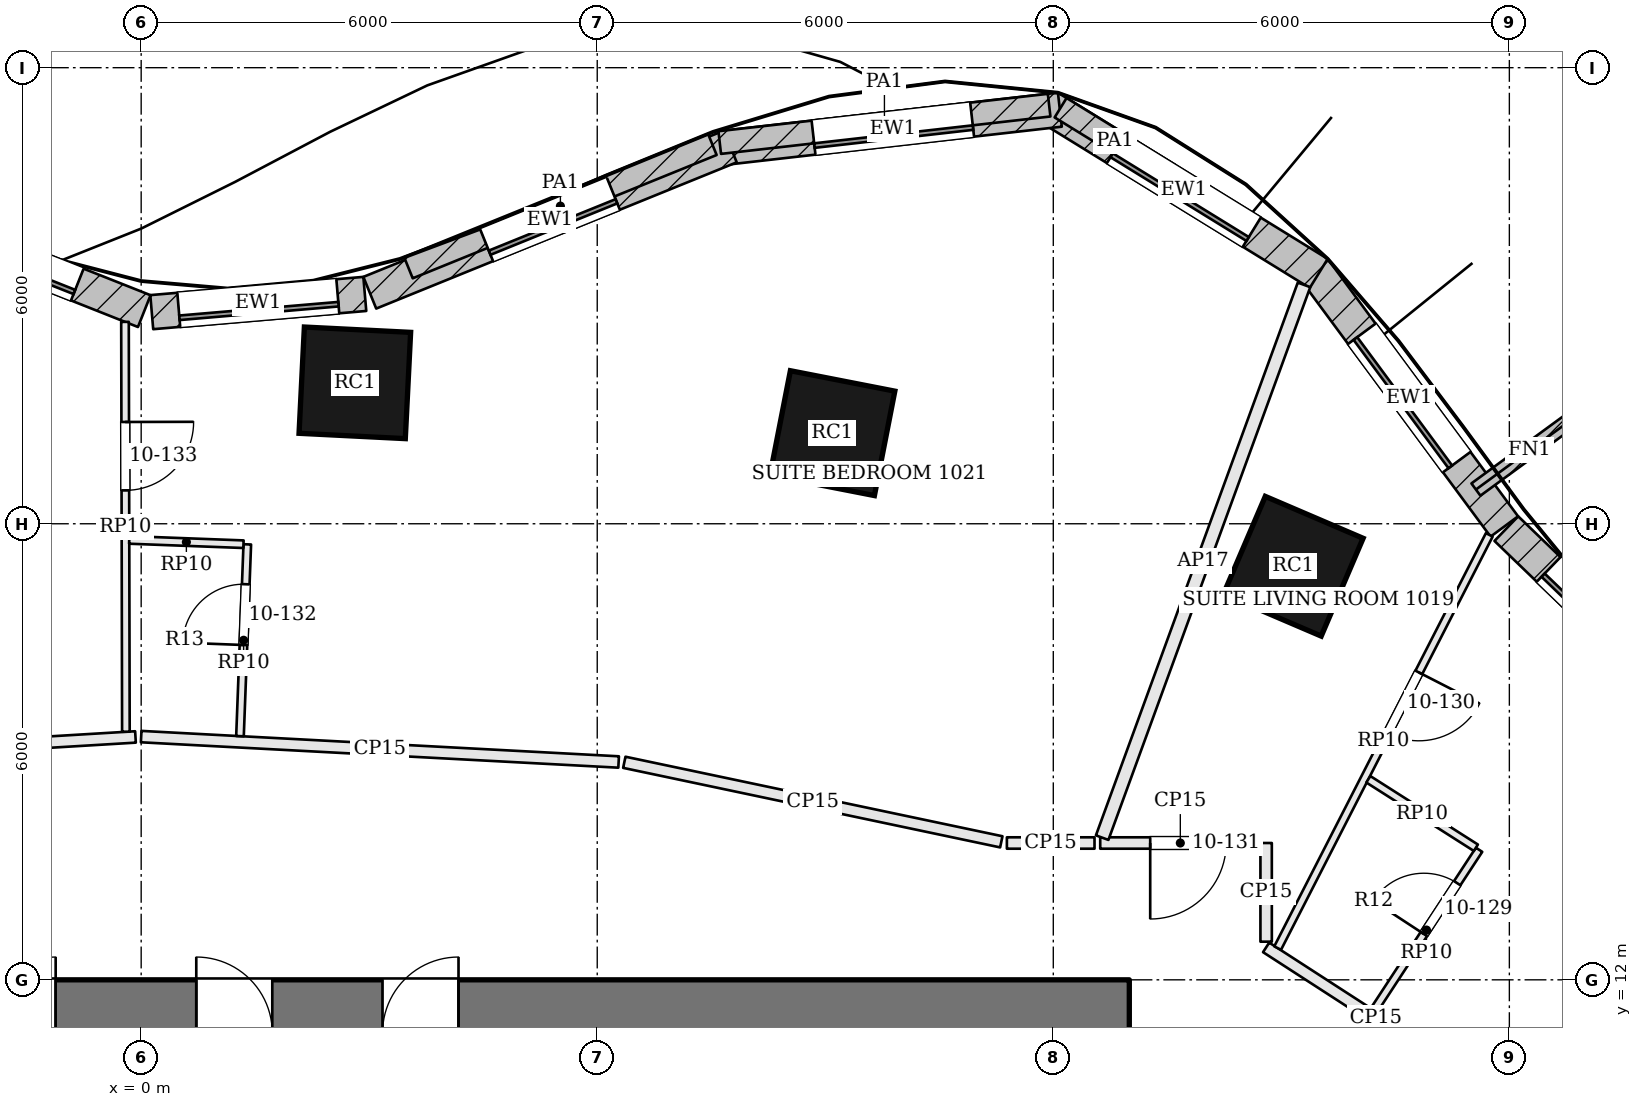
"""IFC4 building model, lengths in metres.
Left out: names, types, materials, properties, quantities, classifications, styles, units other than length and angle.
Written with IfcOpenShell. Run it as: python <this file> out.ifc"""

import sys

from ifc_helpers import new_model, si_unit, direction, frame, frame_2d, origin, origin_2d, place, context, subcontext, project, spatial, rectangle, extrude, element, fill, save


model = new_model("IFC4")
c1 = context("Model", 3, precision=1e-05, world=origin(), true_north=direction((0.0, 1.0)))
c2 = subcontext(c1, "Body", "Model", "MODEL_VIEW")
j1 = project(units=[si_unit("LENGTHUNIT", "METRE"), si_unit("PLANEANGLEUNIT", "RADIAN")], contexts=[c1])
p1 = place(None, origin())
s1 = spatial("IfcSite", under=j1, at=p1, CompositionType="ELEMENT")
p2 = place(p1, origin())
s2 = spatial("IfcBuilding", under=s1, at=p2, CompositionType="ELEMENT")
p3 = place(p2, frame((0.0, 0.0, 51.9)))
s3 = spatial("IfcBuildingStorey", under=s2, at=p3, CompositionType="ELEMENT", Elevation=51.9)
p4 = place(p3, frame((-13.0, 11.3, 0.0), z_axis=(0.0, 0.0, 1.0), x_axis=(1.0, 0.0, 0.0)))
e1 = element("IfcWall", 1, at=p4, inside=s3, PredefinedType="SHEAR", context=c2, shape_type="SweptSolid", body=[
    extrude(rectangle(XDim=26.0, YDim=1.4, at=frame_2d((13.0, 0.0))), origin(), (0.0, 0.0, 1.0), 3.6),
])
p5 = place(p4, frame((8.575, 0.0, 0.0)))
e2 = element("IfcOpeningElement", 2, at=p5, cuts=e1, PredefinedType="OPENING", context=c2, shape_type="SweptSolid", body=[
    extrude(rectangle(XDim=0.7, YDim=2.1, at=frame_2d((0.35, 1.05))), frame((0.0, 0.71, 0.0), z_axis=(0.0, -1.0, 0.0), x_axis=(1.0, 0.0, 0.0)), (0.0, 0.0, 1.0), 1.42),
])
p6 = place(p4, frame((10.875, 0.0, 0.0)))
e3 = element("IfcOpeningElement", 3, at=p6, cuts=e1, PredefinedType="OPENING", context=c2, shape_type="SweptSolid", body=[
    extrude(rectangle(XDim=1.0, YDim=2.1, at=frame_2d((0.5, 1.05))), frame((0.0, 0.71, 0.0), z_axis=(0.0, -1.0, 0.0), x_axis=(1.0, 0.0, 0.0)), (0.0, 0.0, 1.0), 1.42),
])
p7 = place(p4, frame((13.725, 0.0, 0.0)))
e4 = element("IfcOpeningElement", 4, at=p7, cuts=e1, PredefinedType="OPENING", context=c2, shape_type="SweptSolid", body=[
    extrude(rectangle(XDim=1.0, YDim=2.1, at=frame_2d((0.5, 1.05))), frame((0.0, 0.71, 0.0), z_axis=(0.0, -1.0, 0.0), x_axis=(1.0, 0.0, 0.0)), (0.0, 0.0, 1.0), 1.42),
])
p8 = place(p4, frame((16.175, 0.0, 0.0)))
e5 = element("IfcOpeningElement", 5, at=p8, cuts=e1, PredefinedType="OPENING", context=c2, shape_type="SweptSolid", body=[
    extrude(rectangle(XDim=1.0, YDim=2.1, at=frame_2d((0.5, 1.05))), frame((0.0, 0.71, 0.0), z_axis=(0.0, -1.0, 0.0), x_axis=(1.0, 0.0, 0.0)), (0.0, 0.0, 1.0), 1.42),
])
for number, where, z_axis, x_axis in (
    (6, (15.157, 17.441, 0.0), (0.0, 0.0, 1.0), (-0.919, 0.394, 0.0)),
    (7, (9.094, 19.192, 0.0), (0.0, 0.0, 1.0), (-0.981, 0.192, 0.0)),
    (8, (2.811, 19.854, 0.0), (0.0, 0.0, 1.0), (-0.999, 0.05, 0.0)),
):
    element("IfcColumn", number, at=place(p3, frame(where, z_axis=z_axis, x_axis=x_axis)), inside=s3, PredefinedType="COLUMN", context=c2, shape_type="SweptSolid", body=[
        extrude(rectangle(XDim=1.4, YDim=1.4, at=origin_2d()), origin(), (0.0, 0.0, 1.0), 3.6),
    ])
p9 = place(p3, frame((20.585, 15.406, 0.0), z_axis=(0.0, 0.0, 1.0), x_axis=(-0.719978118026, 0.693996764808, 0.0)))
e9 = element("IfcWall", 9, at=p9, inside=s3, PredefinedType="SOLIDWALL", context=c2, shape_type="SweptSolid", body=[
    extrude(rectangle(XDim=3.646, YDim=0.45, at=frame_2d((1.823, 0.0))), origin(), (0.0, 0.0, 1.0), 3.4),
])
p10 = place(p9, frame((0.773, 0.0, 0.9)))
e10 = element("IfcOpeningElement", 10, at=p10, cuts=e9, PredefinedType="OPENING", context=c2, shape_type="SweptSolid", body=[
    extrude(rectangle(XDim=2.1, YDim=2.0, at=frame_2d((1.05, 1.0))), frame((0.0, 0.235, 0.0), z_axis=(0.0, -1.0, 0.0), x_axis=(1.0, 0.0, 0.0)), (0.0, 0.0, 1.0), 0.47),
])
p11 = place(p3, frame((17.934, 17.964, 0.0), z_axis=(0.0, 0.0, 1.0), x_axis=(-0.594544447368, 0.804062746372, 0.0)))
e11 = element("IfcWall", 11, at=p11, inside=s3, PredefinedType="SOLIDWALL", context=c2, shape_type="SweptSolid", body=[
    extrude(rectangle(XDim=4.207, YDim=0.45, at=frame_2d((2.103, 0.0))), origin(), (0.0, 0.0, 1.0), 3.4),
])
p12 = place(p11, frame((1.053, 0.0, 0.9)))
e12 = element("IfcOpeningElement", 12, at=p12, cuts=e11, PredefinedType="OPENING", context=c2, shape_type="SweptSolid", body=[
    extrude(rectangle(XDim=2.1, YDim=2.0, at=frame_2d((1.05, 1.0))), frame((0.0, 0.235, 0.0), z_axis=(0.0, -1.0, 0.0), x_axis=(1.0, 0.0, 0.0)), (0.0, 0.0, 1.0), 0.47),
])
p13 = place(p3, frame((15.492, 21.293, 0.0), z_axis=(0.0, 0.0, 1.0), x_axis=(-0.851428967753, 0.524469935145, 0.0)))
e13 = element("IfcWall", 13, at=p13, inside=s3, PredefinedType="SOLIDWALL", context=c2, shape_type="SweptSolid", body=[
    extrude(rectangle(XDim=4.168, YDim=0.45, at=frame_2d((2.084, 0.0))), origin(), (0.0, 0.0, 1.0), 3.4),
])
p14 = place(p13, frame((1.034, 0.0, 0.9)))
e14 = element("IfcOpeningElement", 14, at=p14, cuts=e13, PredefinedType="OPENING", context=c2, shape_type="SweptSolid", body=[
    extrude(rectangle(XDim=2.1, YDim=2.0, at=frame_2d((1.05, 1.0))), frame((0.0, 0.235, 0.0), z_axis=(0.0, -1.0, 0.0), x_axis=(1.0, 0.0, 0.0)), (0.0, 0.0, 1.0), 0.47),
])
p15 = place(p3, frame((12.086, 23.448, 0.0), z_axis=(0.0, 0.0, 1.0), x_axis=(-0.993615664665, -0.112818043472, 0.0)))
e15 = element("IfcWall", 15, at=p15, inside=s3, PredefinedType="SOLIDWALL", context=c2, shape_type="SweptSolid", body=[
    extrude(rectangle(XDim=4.423, YDim=0.45, at=frame_2d((2.212, 0.0))), origin(), (0.0, 0.0, 1.0), 3.4),
])
p16 = place(p15, frame((1.162, 0.0, 0.9)))
e16 = element("IfcOpeningElement", 16, at=p16, cuts=e15, PredefinedType="OPENING", context=c2, shape_type="SweptSolid", body=[
    extrude(rectangle(XDim=2.1, YDim=2.0, at=frame_2d((1.05, 1.0))), frame((0.0, 0.235, 0.0), z_axis=(0.0, -1.0, 0.0), x_axis=(1.0, 0.0, 0.0)), (0.0, 0.0, 1.0), 0.47),
])
p17 = place(p3, frame((7.75, 22.964, 0.0), z_axis=(0.0, 0.0, 1.0), x_axis=(-0.926629703254, -0.375975255897, 0.0)))
e17 = element("IfcWall", 17, at=p17, inside=s3, PredefinedType="SOLIDWALL", context=c2, shape_type="SweptSolid", body=[
    extrude(rectangle(XDim=5.118, YDim=0.45, at=frame_2d((2.559, 0.0))), origin(), (0.0, 0.0, 1.0), 3.4),
])
p18 = place(p17, frame((1.659, 0.0, 0.9)))
e18 = element("IfcOpeningElement", 18, at=p18, cuts=e17, PredefinedType="OPENING", context=c2, shape_type="SweptSolid", body=[
    extrude(rectangle(XDim=1.8, YDim=2.0, at=frame_2d((0.9, 1.0))), frame((0.0, 0.235, 0.0), z_axis=(0.0, -1.0, 0.0), x_axis=(1.0, 0.0, 0.0)), (0.0, 0.0, 1.0), 0.47),
])
p19 = place(p3, frame((2.942, 21.024, 0.0), z_axis=(0.0, 0.0, 1.0), x_axis=(-0.996362034459, -0.085221454389, 0.0)))
e19 = element("IfcWall", 19, at=p19, inside=s3, PredefinedType="SOLIDWALL", context=c2, shape_type="SweptSolid", body=[
    extrude(rectangle(XDim=2.813, YDim=0.45, at=frame_2d((1.407, 0.0))), origin(), (0.0, 0.0, 1.0), 3.4),
])
p20 = place(p19, frame((0.357, 0.0, 0.9)))
e20 = element("IfcOpeningElement", 20, at=p20, cuts=e19, PredefinedType="OPENING", context=c2, shape_type="SweptSolid", body=[
    extrude(rectangle(XDim=2.1, YDim=2.0, at=frame_2d((1.05, 1.0))), frame((0.0, 0.235, 0.0), z_axis=(0.0, -1.0, 0.0), x_axis=(1.0, 0.0, 0.0)), (0.0, 0.0, 1.0), 0.47),
])
p21 = place(p3, frame((0.041, 20.798, 0.0), z_axis=(0.0, 0.0, 1.0), x_axis=(-0.929539262027, 0.368723148649, 0.0)))
e21 = element("IfcWall", 21, at=p21, inside=s3, PredefinedType="SOLIDWALL", context=c2, shape_type="SweptSolid", body=[
    extrude(rectangle(XDim=3.995, YDim=0.45, at=frame_2d((1.997, 0.0))), origin(), (0.0, 0.0, 1.0), 3.4),
])
p22 = place(p21, frame((0.947, 0.0, 0.9)))
e22 = element("IfcOpeningElement", 22, at=p22, cuts=e21, PredefinedType="OPENING", context=c2, shape_type="SweptSolid", body=[
    extrude(rectangle(XDim=2.1, YDim=2.0, at=frame_2d((1.05, 1.0))), frame((0.0, 0.235, 0.0), z_axis=(0.0, -1.0, 0.0), x_axis=(1.0, 0.0, 0.0)), (0.0, 0.0, 1.0), 0.47),
])
p23 = place(p3, frame((17.56, 18.45, 0.0), z_axis=(0.0, 0.0, 1.0), x_axis=(0.807091943364, 0.590425774299, 0.0)))
e23 = element("IfcWall", 23, at=p23, inside=s3, PredefinedType="SOLIDWALL", context=c2, shape_type="SweptSolid", body=[
    extrude(rectangle(XDim=1.75, YDim=0.2, at=frame_2d((0.875, 0.0))), origin(), (0.0, 0.0, 1.0), 3.4),
])
p24 = place(p3, frame((13.53, 22.59, 3.6), z_axis=(0.0, 0.0, 1.0), x_axis=(-0.851434206084, 0.524461431098, 0.0)))
e24 = element("IfcWall", 24, at=p24, inside=s3, PredefinedType="PARAPET", context=c2, shape_type="SweptSolid", body=[
    extrude(rectangle(XDim=1.684, YDim=0.3, at=frame_2d((0.842, 0.0))), origin(), (0.0, 0.0, 1.0), 1.1),
])
p25 = place(p3, frame((11.945, 23.507, 3.6), z_axis=(0.0, 0.0, 1.0), x_axis=(-0.993618806168, -0.11279037206, 0.0)))
e25 = element("IfcWall", 25, at=p25, inside=s3, PredefinedType="PARAPET", context=c2, shape_type="SweptSolid", body=[
    extrude(rectangle(XDim=4.362, YDim=0.3, at=frame_2d((2.181, 0.0))), origin(), (0.0, 0.0, 1.0), 1.1),
])
p26 = place(p3, frame((7.514, 22.99, 3.6), z_axis=(0.0, 0.0, 1.0), x_axis=(-0.926627413994, -0.375980897966, 0.0)))
e26 = element("IfcWall", 26, at=p26, inside=s3, PredefinedType="PARAPET", context=c2, shape_type="SweptSolid", body=[
    extrude(rectangle(XDim=4.315, YDim=0.3, at=frame_2d((2.157, 0.0))), origin(), (0.0, 0.0, 1.0), 1.1),
])
p27 = place(p3, frame((17.691, 10.556, 0.0), z_axis=(0.0, 0.0, 1.0), x_axis=(-0.839564450265, 0.54326009779, 0.0)))
e27 = element("IfcWall", 27, at=p27, inside=s3, PredefinedType="PARTITIONING", context=c2, shape_type="SweptSolid", body=[
    extrude(rectangle(XDim=3.443, YDim=0.15, at=frame_2d((1.722, 0.0))), origin(), (0.0, 0.0, 1.0), 2.68),
])
p28 = place(p3, frame((14.8, 12.502, 0.0), z_axis=(0.0, 0.0, 1.0), x_axis=(-0.000188040613, 0.99999998232, 0.0)))
e28 = element("IfcWall", 28, at=p28, inside=s3, PredefinedType="PARTITIONING", context=c2, shape_type="SweptSolid", body=[
    extrude(rectangle(XDim=1.298, YDim=0.15, at=frame_2d((0.649, 0.0))), origin(), (0.0, 0.0, 1.0), 2.68),
])
p29 = place(p3, frame((14.725, 13.8, 0.0), z_axis=(0.0, 0.0, 1.0), x_axis=(-1.0, 0.0, 0.0)))
e29 = element("IfcWall", 29, at=p29, inside=s3, PredefinedType="PARTITIONING", context=c2, shape_type="SweptSolid", body=[
    extrude(rectangle(XDim=2.108, YDim=0.15, at=frame_2d((1.054, 0.0))), origin(), (0.0, 0.0, 1.0), 2.68),
])
p30 = place(p29, frame((0.45, 0.0, 0.0)))
e30 = element("IfcOpeningElement", 30, at=p30, cuts=e29, PredefinedType="OPENING", context=c2, shape_type="SweptSolid", body=[
    extrude(rectangle(XDim=1.0, YDim=2.1, at=frame_2d((0.5, 1.05))), frame((0.0, 0.085, 0.0), z_axis=(0.0, -1.0, 0.0), x_axis=(1.0, 0.0, 0.0)), (0.0, 0.0, 1.0), 0.17),
])
p31 = place(p3, frame((15.299, 21.143, 0.0), z_axis=(0.0, 0.0, 1.0), x_axis=(-0.343006226001, -0.939333129898, 0.0)))
e31 = element("IfcWall", 31, at=p31, inside=s3, PredefinedType="PARTITIONING", context=c2, shape_type="SweptSolid", body=[
    extrude(rectangle(XDim=7.742, YDim=0.175, at=frame_2d((3.871, 0.0))), origin(), (0.0, 0.0, 1.0), 2.68),
])
p32 = place(p3, frame((12.542, 13.8, 0.0), z_axis=(0.0, 0.0, 1.0), x_axis=(-1.0, 0.0, 0.0)))
e32 = element("IfcWall", 32, at=p32, inside=s3, PredefinedType="PARTITIONING", context=c2, shape_type="SweptSolid", body=[
    extrude(rectangle(XDim=1.153, YDim=0.15, at=frame_2d((0.576, 0.0))), origin(), (0.0, 0.0, 1.0), 2.68),
])
p33 = place(p3, frame((11.316, 13.815, 0.0), z_axis=(0.0, 0.0, 1.0), x_axis=(-0.978460774853, 0.206432827025, 0.0)))
e33 = element("IfcWall", 33, at=p33, inside=s3, PredefinedType="PARTITIONING", context=c2, shape_type="SweptSolid", body=[
    extrude(rectangle(XDim=5.069, YDim=0.15, at=frame_2d((2.534, 0.0))), origin(), (0.0, 0.0, 1.0), 2.68),
])
p34 = place(p3, frame((6.281, 14.866, 0.0), z_axis=(0.0, 0.0, 1.0), x_axis=(-0.998587429539, 0.053133281163, 0.0)))
e34 = element("IfcWall", 34, at=p34, inside=s3, PredefinedType="PARTITIONING", context=c2, shape_type="SweptSolid", body=[
    extrude(rectangle(XDim=6.29, YDim=0.15, at=frame_2d((3.145, 0.0))), origin(), (0.0, 0.0, 1.0), 2.68),
])
p35 = place(p3, frame((-0.075, 15.195, 0.0), z_axis=(0.0, 0.0, 1.0), x_axis=(-0.998193444214, -0.060082010028, 0.0)))
e35 = element("IfcWall", 35, at=p35, inside=s3, PredefinedType="PARTITIONING", context=c2, shape_type="SweptSolid", body=[
    extrude(rectangle(XDim=6.514, YDim=0.15, at=frame_2d((3.257, 0.0))), origin(), (0.0, 0.0, 1.0), 2.68),
])
p36 = place(p35, frame((2.859, 0.0, 0.0)))
e36 = element("IfcOpeningElement", 36, at=p36, cuts=e35, PredefinedType="OPENING", context=c2, shape_type="SweptSolid", body=[
    extrude(rectangle(XDim=1.0, YDim=2.1, at=frame_2d((0.5, 1.05))), frame((0.0, 0.085, 0.0), z_axis=(0.0, -1.0, 0.0), x_axis=(1.0, 0.0, 0.0)), (0.0, 0.0, 1.0), 0.17),
])
p37 = place(p3, frame((17.736, 17.854, 0.0), z_axis=(0.0, 0.0, 1.0), x_axis=(-0.455842659808, -0.890060374075, 0.0)))
e37 = element("IfcWall", 37, at=p37, inside=s3, PredefinedType="PARTITIONING", context=c2, shape_type="SweptSolid", body=[
    extrude(rectangle(XDim=6.108, YDim=0.1, at=frame_2d((3.054, 0.0))), origin(), (0.0, 0.0, 1.0), 2.898),
])
p38 = place(p37, frame((2.033, 0.0, 0.0)))
e38 = element("IfcOpeningElement", 38, at=p38, cuts=e37, PredefinedType="OPENING", context=c2, shape_type="SweptSolid", body=[
    extrude(rectangle(XDim=0.9, YDim=2.4, at=frame_2d((0.45, 1.2))), frame((0.0, 0.06, 0.0), z_axis=(0.0, -1.0, 0.0), x_axis=(1.0, 0.0, 0.0)), (0.0, 0.0, 1.0), 0.12),
])
p39 = place(p3, frame((16.218, 11.599, 0.0), z_axis=(0.0, 0.0, 1.0), x_axis=(0.547988935577, 0.83648558056, 0.0)))
e39 = element("IfcWall", 39, at=p39, inside=s3, PredefinedType="PARTITIONING", context=c2, shape_type="SweptSolid", body=[
    extrude(rectangle(XDim=2.525, YDim=0.1, at=frame_2d((1.263, 0.0))), origin(), (0.0, 0.0, 1.0), 2.898),
])
p40 = place(p39, frame((1.2, 0.0, 0.0)))
e40 = element("IfcOpeningElement", 40, at=p40, cuts=e39, PredefinedType="OPENING", context=c2, shape_type="SweptSolid", body=[
    extrude(rectangle(XDim=0.8, YDim=2.1, at=frame_2d((0.4, 1.05))), frame((0.0, 0.06, 0.0), z_axis=(0.0, -1.0, 0.0), x_axis=(1.0, 0.0, 0.0)), (0.0, 0.0, 1.0), 0.12),
])
p41 = place(p3, frame((17.56, 13.738, 0.0), z_axis=(0.0, 0.0, 1.0), x_axis=(-0.843601529877, 0.536969700067, 0.0)))
e41 = element("IfcWall", 41, at=p41, inside=s3, PredefinedType="PARTITIONING", context=c2, shape_type="SweptSolid", body=[
    extrude(rectangle(XDim=1.677, YDim=0.1, at=frame_2d((0.838, 0.0))), origin(), (0.0, 0.0, 1.0), 2.898),
])
p42 = place(p3, frame((-0.213, 20.656, 0.0), z_axis=(0.0, 0.0, 1.0), x_axis=(0.002218695015, -0.999997538693, 0.0)))
e42 = element("IfcWall", 42, at=p42, inside=s3, PredefinedType="PARTITIONING", context=c2, shape_type="SweptSolid", body=[
    extrude(rectangle(XDim=5.392, YDim=0.1, at=frame_2d((2.696, 0.0))), origin(), (0.0, 0.0, 1.0), 2.898),
])
p43 = place(p42, frame((1.317, 0.0, 0.0)))
e43 = element("IfcOpeningElement", 43, at=p43, cuts=e42, PredefinedType="OPENING", context=c2, shape_type="SweptSolid", body=[
    extrude(rectangle(XDim=0.9, YDim=2.4, at=frame_2d((0.45, 1.2))), frame((0.0, 0.06, 0.0), z_axis=(0.0, -1.0, 0.0), x_axis=(1.0, 0.0, 0.0)), (0.0, 0.0, 1.0), 0.12),
])
p44 = place(p3, frame((1.3, 15.206, 0.0), z_axis=(0.0, 0.0, 1.0), x_axis=(0.037998661973, 0.999277790051, 0.0)))
e44 = element("IfcWall", 44, at=p44, inside=s3, PredefinedType="PARTITIONING", context=c2, shape_type="SweptSolid", body=[
    extrude(rectangle(XDim=2.525, YDim=0.1, at=frame_2d((1.262, 0.0))), origin(), (0.0, 0.0, 1.0), 2.898),
])
p45 = place(p44, frame((1.2, 0.0, 0.0)))
e45 = element("IfcOpeningElement", 45, at=p45, cuts=e44, PredefinedType="OPENING", context=c2, shape_type="SweptSolid", body=[
    extrude(rectangle(XDim=0.8, YDim=2.1, at=frame_2d((0.4, 1.05))), frame((0.0, 0.06, 0.0), z_axis=(0.0, -1.0, 0.0), x_axis=(1.0, 0.0, 0.0)), (0.0, 0.0, 1.0), 0.12),
])
p46 = place(p3, frame((1.346, 17.731, 0.0), z_axis=(0.0, 0.0, 1.0), x_axis=(-0.999296246873, 0.037510145113, 0.0)))
e46 = element("IfcWall", 46, at=p46, inside=s3, PredefinedType="PARTITIONING", context=c2, shape_type="SweptSolid", body=[
    extrude(rectangle(XDim=1.503, YDim=0.1, at=frame_2d((0.752, 0.0))), origin(), (0.0, 0.0, 1.0), 2.898),
])
p47 = place(p10, origin())
e47 = element("IfcWindow", 47, at=p47, inside=s3, PartitioningType="SINGLE_PANEL", PredefinedType="WINDOW", context=c2, shape_type="SweptSolid", body=[
    extrude(rectangle(XDim=2.1, YDim=2.0, at=frame_2d((1.05, 1.0))), frame((0.0, 0.135, 0.0), z_axis=(0.0, -1.0, 0.0), x_axis=(1.0, 0.0, 0.0)), (0.0, 0.0, 1.0), 0.06),
])
fill(e10, e47)
p48 = place(p12, origin())
e48 = element("IfcWindow", 48, at=p48, inside=s3, PartitioningType="SINGLE_PANEL", PredefinedType="WINDOW", context=c2, shape_type="SweptSolid", body=[
    extrude(rectangle(XDim=2.1, YDim=2.0, at=frame_2d((1.05, 1.0))), frame((0.0, 0.135, 0.0), z_axis=(0.0, -1.0, 0.0), x_axis=(1.0, 0.0, 0.0)), (0.0, 0.0, 1.0), 0.06),
])
fill(e12, e48)
p49 = place(p14, origin())
e49 = element("IfcWindow", 49, at=p49, inside=s3, PartitioningType="SINGLE_PANEL", PredefinedType="WINDOW", context=c2, shape_type="SweptSolid", body=[
    extrude(rectangle(XDim=2.1, YDim=2.0, at=frame_2d((1.05, 1.0))), frame((0.0, 0.135, 0.0), z_axis=(0.0, -1.0, 0.0), x_axis=(1.0, 0.0, 0.0)), (0.0, 0.0, 1.0), 0.06),
])
fill(e14, e49)
p50 = place(p16, origin())
e50 = element("IfcWindow", 50, at=p50, inside=s3, PartitioningType="SINGLE_PANEL", PredefinedType="WINDOW", context=c2, shape_type="SweptSolid", body=[
    extrude(rectangle(XDim=2.1, YDim=2.0, at=frame_2d((1.05, 1.0))), frame((0.0, 0.135, 0.0), z_axis=(0.0, -1.0, 0.0), x_axis=(1.0, 0.0, 0.0)), (0.0, 0.0, 1.0), 0.06),
])
fill(e16, e50)
p51 = place(p18, origin())
e51 = element("IfcWindow", 51, at=p51, inside=s3, PartitioningType="SINGLE_PANEL", PredefinedType="WINDOW", context=c2, shape_type="SweptSolid", body=[
    extrude(rectangle(XDim=1.8, YDim=2.0, at=frame_2d((0.9, 1.0))), frame((0.0, 0.135, 0.0), z_axis=(0.0, -1.0, 0.0), x_axis=(1.0, 0.0, 0.0)), (0.0, 0.0, 1.0), 0.06),
])
fill(e18, e51)
p52 = place(p20, origin())
e52 = element("IfcWindow", 52, at=p52, inside=s3, PartitioningType="SINGLE_PANEL", PredefinedType="WINDOW", context=c2, shape_type="SweptSolid", body=[
    extrude(rectangle(XDim=2.1, YDim=2.0, at=frame_2d((1.05, 1.0))), frame((0.0, 0.135, 0.0), z_axis=(0.0, -1.0, 0.0), x_axis=(1.0, 0.0, 0.0)), (0.0, 0.0, 1.0), 0.06),
])
fill(e20, e52)
p53 = place(p22, origin())
e53 = element("IfcWindow", 53, at=p53, inside=s3, PartitioningType="SINGLE_PANEL", PredefinedType="WINDOW", context=c2, shape_type="SweptSolid", body=[
    extrude(rectangle(XDim=2.1, YDim=2.0, at=frame_2d((1.05, 1.0))), frame((0.0, 0.135, 0.0), z_axis=(0.0, -1.0, 0.0), x_axis=(1.0, 0.0, 0.0)), (0.0, 0.0, 1.0), 0.06),
])
fill(e22, e53)
p54 = place(p40, origin())
e54 = element("IfcDoor", 54, at=p54, inside=s3, OperationType="SINGLE_SWING_LEFT", PredefinedType="DOOR", context=c2, shape_type="SweptSolid", body=[
    extrude(rectangle(XDim=0.8, YDim=2.1, at=frame_2d((0.4, 1.05))), frame((0.0, 0.025, 0.0), z_axis=(0.0, -1.0, 0.0), x_axis=(1.0, 0.0, 0.0)), (0.0, 0.0, 1.0), 0.05),
])
fill(e40, e54)
p55 = place(p38, origin())
e55 = element("IfcDoor", 55, at=p55, inside=s3, OperationType="SINGLE_SWING_LEFT", PredefinedType="DOOR", context=c2, shape_type="SweptSolid", body=[
    extrude(rectangle(XDim=0.9, YDim=2.4, at=frame_2d((0.45, 1.2))), frame((0.0, 0.025, 0.0), z_axis=(0.0, -1.0, 0.0), x_axis=(1.0, 0.0, 0.0)), (0.0, 0.0, 1.0), 0.05),
])
fill(e38, e55)
p56 = place(p30, origin())
e56 = element("IfcDoor", 56, at=p56, inside=s3, OperationType="SINGLE_SWING_RIGHT", PredefinedType="DOOR", context=c2, shape_type="SweptSolid", body=[
    extrude(rectangle(XDim=1.0, YDim=2.1, at=frame_2d((0.5, 1.05))), frame((0.0, 0.025, 0.0), z_axis=(0.0, -1.0, 0.0), x_axis=(1.0, 0.0, 0.0)), (0.0, 0.0, 1.0), 0.05),
])
fill(e30, e56)
p57 = place(p45, origin())
e57 = element("IfcDoor", 57, at=p57, inside=s3, OperationType="SINGLE_SWING_LEFT", PredefinedType="DOOR", context=c2, shape_type="SweptSolid", body=[
    extrude(rectangle(XDim=0.8, YDim=2.1, at=frame_2d((0.4, 1.05))), frame((0.0, 0.025, 0.0), z_axis=(0.0, -1.0, 0.0), x_axis=(1.0, 0.0, 0.0)), (0.0, 0.0, 1.0), 0.05),
])
fill(e45, e57)
p58 = place(p43, origin())
e58 = element("IfcDoor", 58, at=p58, inside=s3, OperationType="SINGLE_SWING_LEFT", PredefinedType="DOOR", context=c2, shape_type="SweptSolid", body=[
    extrude(rectangle(XDim=0.9, YDim=2.4, at=frame_2d((0.45, 1.2))), frame((0.0, 0.025, 0.0), z_axis=(0.0, -1.0, 0.0), x_axis=(1.0, 0.0, 0.0)), (0.0, 0.0, 1.0), 0.05),
])
fill(e43, e58)
save(model, sys.argv[1])
